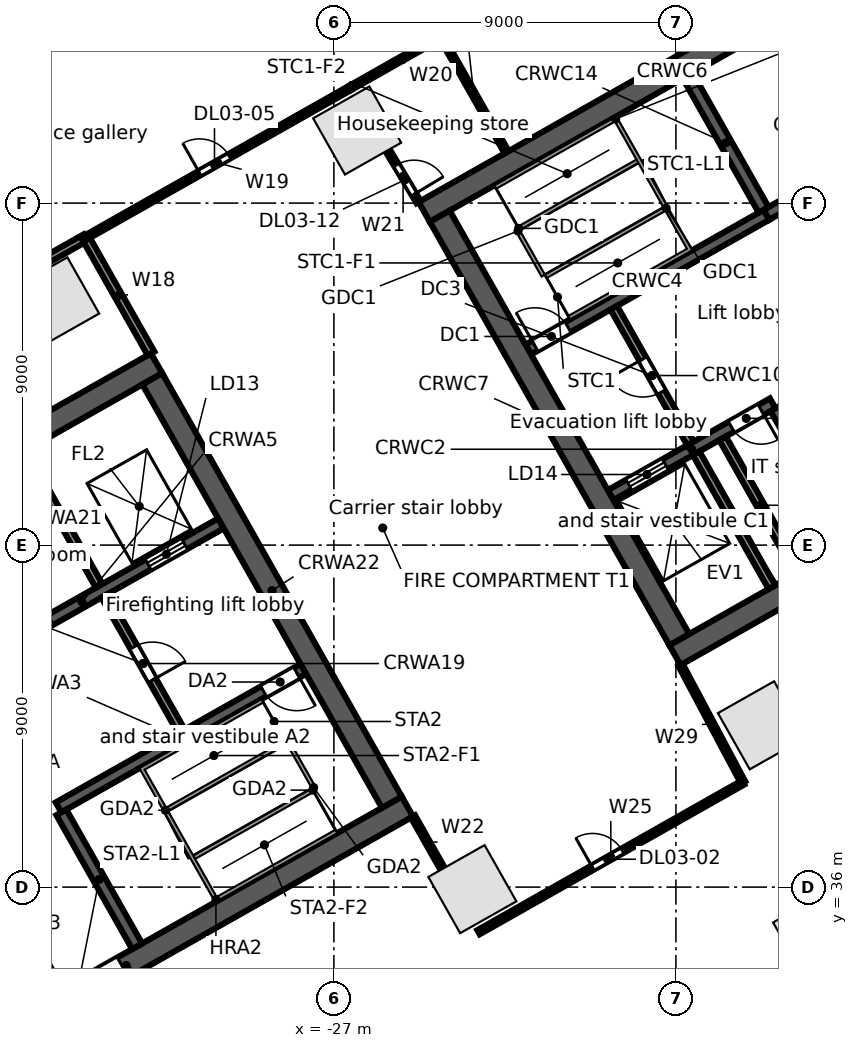
"""IFC4 building model, lengths in metres.
Left out: names, types, materials, properties, quantities, classifications, styles, units other than length and angle.
Written with IfcOpenShell. Run it as: python <this file> out.ifc"""

import sys

from ifc_helpers import new_model, si_unit, direction, frame, frame_2d, origin, origin_2d, place, context, subcontext, project, spatial, rectangle, extrude, element, fill, save


model = new_model("IFC4")
c1 = context("Model", 3, precision=1e-05, world=origin(), true_north=direction((0.0, 1.0)))
c2 = subcontext(c1, "Body", "Model", "MODEL_VIEW")
j1 = project(units=[si_unit("LENGTHUNIT", "METRE"), si_unit("PLANEANGLEUNIT", "RADIAN")], contexts=[c1])
p1 = place(None, origin())
s1 = spatial("IfcSite", under=j1, at=p1, CompositionType="ELEMENT")
p2 = place(p1, origin())
s2 = spatial("IfcBuilding", under=s1, at=p2, CompositionType="ELEMENT")
p3 = place(p2, frame((0.0, 0.0, 16.5)))
s3 = spatial("IfcBuildingStorey", under=s2, at=p3, CompositionType="ELEMENT", Elevation=16.5)
for number, where, z_axis, x_axis in (
    (1, (-26.388, 55.91, 0.0), (0.0, 0.0, 1.0), (-0.87, -0.492, 0.0)),
    (2, (-34.334, 51.414, 0.0), (0.0, 0.0, 1.0), (-0.87, -0.492, 0.0)),
    (3, (-23.356, 35.946, 0.0), (0.0, 0.0, 1.0), (0.87, 0.492, 0.0)),
    (4, (-15.736, 40.257, 0.0), (0.0, 0.0, 1.0), (0.87, 0.492, 0.0)),
):
    element("IfcColumn", number, at=place(p3, frame(where, z_axis=z_axis, x_axis=x_axis)), inside=s3, PredefinedType="COLUMN", context=c2, shape_type="SweptSolid", body=[
        extrude(rectangle(XDim=1.7, YDim=1.7, at=origin_2d()), origin(), (0.0, 0.0, 1.0), 5.0),
    ])
p4 = place(p3, frame((-14.761, 34.88, 0.0), z_axis=(0.0, 0.0, 1.0), x_axis=(0.87035569594, 0.492423560103, 0.0)))
e5 = element("IfcColumn", 5, at=p4, inside=s3, PredefinedType="COLUMN", context=c2, shape_type="SweptSolid", body=[
    extrude(rectangle(XDim=1.0, YDim=1.0, at=origin_2d()), origin(), (0.0, 0.0, 1.0), 5.0),
])
p5 = place(p3, frame((-63.707, 41.701, 0.0), z_axis=(0.0, 0.0, 1.0), x_axis=(0.870355510268, 0.492423888277, 0.0)))
e6 = element("IfcWall", 6, at=p5, inside=s3, PredefinedType="STANDARD", context=c2, shape_type="SweptSolid", body=[
    extrude(rectangle(XDim=67.903, YDim=0.3, at=frame_2d((33.952, 0.0))), origin(), (0.0, 0.0, 1.0), 4.65),
])
p6 = place(p3, frame((-39.862, 29.749, 0.0), z_axis=(0.0, 0.0, 1.0), x_axis=(0.870350116061, 0.492433422375, 0.0)))
e7 = element("IfcWall", 7, at=p6, inside=s3, PredefinedType="SOLIDWALL", context=c2, shape_type="SweptSolid", body=[
    extrude(rectangle(XDim=17.0, YDim=0.6, at=frame_2d((8.5, 0.0))), origin(), (0.0, 0.0, 1.0), 4.65),
])
p7 = place(p6, frame((7.2, 0.0, 0.0)))
e8 = element("IfcOpeningElement", 8, at=p7, cuts=e7, PredefinedType="OPENING", context=c2, shape_type="SweptSolid", body=[
    extrude(rectangle(XDim=1.2, YDim=2.1, at=frame_2d((0.6, 1.05))), frame((0.0, 0.31, 0.0), z_axis=(0.0, -1.0, 0.0), x_axis=(1.0, 0.0, 0.0)), (0.0, 0.0, 1.0), 0.62),
])
p8 = place(p3, frame((-34.245, 38.097, 0.0), z_axis=(0.0, 0.0, 1.0), x_axis=(0.870364910201, 0.492407273597, 0.0)))
e9 = element("IfcWall", 9, at=p8, inside=s3, PredefinedType="SOLIDWALL", context=c2, shape_type="SweptSolid", body=[
    extrude(rectangle(XDim=7.4, YDim=0.3, at=frame_2d((3.7, 0.0))), origin(), (0.0, 0.0, 1.0), 4.65),
])
p9 = place(p8, frame((6.2, 0.0, 0.0)))
e10 = element("IfcOpeningElement", 10, at=p9, cuts=e9, PredefinedType="OPENING", context=c2, shape_type="SweptSolid", body=[
    extrude(rectangle(XDim=1.0, YDim=2.1, at=frame_2d((0.5, 1.05))), frame((0.0, 0.16, 0.0), z_axis=(0.0, -1.0, 0.0), x_axis=(1.0, 0.0, 0.0)), (0.0, 0.0, 1.0), 0.32),
])
p10 = place(p3, frame((-37.282, 41.435, 0.0), z_axis=(0.0, 0.0, 1.0), x_axis=(0.870356516133, 0.492422110414, 0.0)))
e11 = element("IfcWall", 11, at=p10, inside=s3, PredefinedType="SOLIDWALL", context=c2, shape_type="SweptSolid", body=[
    extrude(rectangle(XDim=8.4, YDim=0.3, at=frame_2d((4.2, 0.0))), origin(), (0.0, 0.0, 1.0), 4.65),
])
p11 = place(p10, frame((6.2, 0.0, 0.0)))
e12 = element("IfcOpeningElement", 12, at=p11, cuts=e11, PredefinedType="OPENING", context=c2, shape_type="SweptSolid", body=[
    extrude(rectangle(XDim=1.1, YDim=2.1, at=frame_2d((0.55, 1.05))), frame((0.0, 0.16, 0.0), z_axis=(0.0, -1.0, 0.0), x_axis=(1.0, 0.0, 0.0)), (0.0, 0.0, 1.0), 0.32),
])
p12 = place(p10, frame((2.35, 0.0, 0.0)))
e13 = element("IfcOpeningElement", 13, at=p12, cuts=e11, PredefinedType="OPENING", context=c2, shape_type="SweptSolid", body=[
    extrude(rectangle(XDim=0.9, YDim=2.1, at=frame_2d((0.45, 1.05))), frame((0.0, 0.16, 0.0), z_axis=(0.0, -1.0, 0.0), x_axis=(1.0, 0.0, 0.0)), (0.0, 0.0, 1.0), 0.32),
])
p13 = place(p3, frame((-46.461, 41.412, 0.0), z_axis=(0.0, 0.0, 1.0), x_axis=(0.870350116061, 0.492433422375, 0.0)))
e14 = element("IfcWall", 14, at=p13, inside=s3, PredefinedType="SOLIDWALL", context=c2, shape_type="SweptSolid", body=[
    extrude(rectangle(XDim=17.0, YDim=0.6, at=frame_2d((8.5, 0.0))), origin(), (0.0, 0.0, 1.0), 4.65),
])
p14 = place(p3, frame((-36.26, 36.785, 0.0), z_axis=(0.0, 0.0, 1.0), x_axis=(0.492440575896, -0.870346068648, 0.0)))
e15 = element("IfcWall", 15, at=p14, inside=s3, PredefinedType="SOLIDWALL", context=c2, shape_type="SweptSolid", body=[
    extrude(rectangle(XDim=4.05, YDim=0.3, at=frame_2d((2.025, 0.0))), origin(), (0.0, 0.0, 1.0), 4.65),
])
p15 = place(p3, frame((-34.171, 37.967, 0.0), z_axis=(0.0, 0.0, 1.0), x_axis=(0.492394910396, -0.870371904542, 0.0)))
e16 = element("IfcWall", 16, at=p15, inside=s3, PredefinedType="SOLIDWALL", context=c2, shape_type="SweptSolid", body=[
    extrude(rectangle(XDim=4.05, YDim=0.3, at=frame_2d((2.025, 0.0))), origin(), (0.0, 0.0, 1.0), 4.65),
])
p16 = place(p3, frame((-33.031, 43.667, 0.0), z_axis=(0.0, 0.0, 1.0), x_axis=(0.492408451753, -0.87036424366, 0.0)))
e17 = element("IfcWall", 17, at=p16, inside=s3, PredefinedType="PARTITIONING", context=c2, shape_type="SweptSolid", body=[
    extrude(rectangle(XDim=4.1, YDim=0.2, at=frame_2d((2.05, 0.0))), origin(), (0.0, 0.0, 1.0), 4.65),
])
p17 = place(p16, frame((1.55, 0.0, 0.0)))
e18 = element("IfcOpeningElement", 18, at=p17, cuts=e17, PredefinedType="OPENING", context=c2, shape_type="SweptSolid", body=[
    extrude(rectangle(XDim=1.0, YDim=2.1, at=frame_2d((0.5, 1.05))), frame((0.0, 0.11, 0.0), z_axis=(0.0, -1.0, 0.0), x_axis=(1.0, 0.0, 0.0)), (0.0, 0.0, 1.0), 0.22),
])
p18 = place(p3, frame((-35.173, 47.454, 0.0), z_axis=(0.0, 0.0, 1.0), x_axis=(0.492440575896, -0.870346068648, 0.0)))
e19 = element("IfcWall", 19, at=p18, inside=s3, PredefinedType="SOLIDWALL", context=c2, shape_type="SweptSolid", body=[
    extrude(rectangle(XDim=4.05, YDim=0.2, at=frame_2d((2.025, 0.0))), origin(), (0.0, 0.0, 1.0), 4.65),
])
p19 = place(p3, frame((-31.778, 49.374, 0.0), z_axis=(0.0, 0.0, 1.0), x_axis=(0.492433046652, -0.870350328641, 0.0)))
e20 = element("IfcWall", 20, at=p19, inside=s3, PredefinedType="SOLIDWALL", context=c2, shape_type="SweptSolid", body=[
    extrude(rectangle(XDim=12.8, YDim=0.6, at=frame_2d((6.4, 0.0))), origin(), (0.0, 0.0, 1.0), 4.65),
])
p20 = place(p3, frame((-18.024, 42.104, 0.0), z_axis=(0.0, 0.0, 1.0), x_axis=(0.870360574057, 0.492414937962, 0.0)))
e21 = element("IfcWall", 21, at=p20, inside=s3, PredefinedType="SOLIDWALL", context=c2, shape_type="SweptSolid", body=[
    extrude(rectangle(XDim=15.0, YDim=0.6, at=frame_2d((7.5, 0.0))), origin(), (0.0, 0.0, 1.0), 4.65),
])
p21 = place(p20, frame((6.1, 0.0, 0.0)))
e22 = element("IfcOpeningElement", 22, at=p21, cuts=e21, PredefinedType="OPENING", context=c2, shape_type="SweptSolid", body=[
    extrude(rectangle(XDim=1.2, YDim=2.1, at=frame_2d((0.6, 1.05))), frame((0.0, 0.31, 0.0), z_axis=(0.0, -1.0, 0.0), x_axis=(1.0, 0.0, 0.0)), (0.0, 0.0, 1.0), 0.62),
])
p22 = place(p3, frame((-19.718, 46.316, 0.0), z_axis=(0.0, 0.0, 1.0), x_axis=(0.870353963862, 0.492426621528, 0.0)))
e23 = element("IfcWall", 23, at=p22, inside=s3, PredefinedType="SOLIDWALL", context=c2, shape_type="SweptSolid", body=[
    extrude(rectangle(XDim=4.9, YDim=0.3, at=frame_2d((2.45, 0.0))), origin(), (0.0, 0.0, 1.0), 4.65),
])
p23 = place(p22, frame((0.55, 0.0, 0.0)))
e24 = element("IfcOpeningElement", 24, at=p23, cuts=e23, PredefinedType="OPENING", context=c2, shape_type="SweptSolid", body=[
    extrude(rectangle(XDim=1.1, YDim=2.1, at=frame_2d((0.55, 1.05))), frame((0.0, 0.16, 0.0), z_axis=(0.0, -1.0, 0.0), x_axis=(1.0, 0.0, 0.0)), (0.0, 0.0, 1.0), 0.32),
])
p24 = place(p22, frame((3.65, 0.0, 0.0)))
e25 = element("IfcOpeningElement", 25, at=p24, cuts=e23, PredefinedType="OPENING", context=c2, shape_type="SweptSolid", body=[
    extrude(rectangle(XDim=0.9, YDim=2.1, at=frame_2d((0.45, 1.05))), frame((0.0, 0.16, 0.0), z_axis=(0.0, -1.0, 0.0), x_axis=(1.0, 0.0, 0.0)), (0.0, 0.0, 1.0), 0.32),
])
p25 = place(p3, frame((-21.885, 50.146, 0.0), z_axis=(0.0, 0.0, 1.0), x_axis=(0.870359411463, 0.492416992881, 0.0)))
e26 = element("IfcWall", 26, at=p25, inside=s3, PredefinedType="SOLIDWALL", context=c2, shape_type="SweptSolid", body=[
    extrude(rectangle(XDim=7.2, YDim=0.3, at=frame_2d((3.6, 0.0))), origin(), (0.0, 0.0, 1.0), 4.65),
])
p26 = place(p25, frame((0.2, 0.0, 0.0)))
e27 = element("IfcOpeningElement", 27, at=p26, cuts=e26, PredefinedType="OPENING", context=c2, shape_type="SweptSolid", body=[
    extrude(rectangle(XDim=1.0, YDim=2.1, at=frame_2d((0.5, 1.05))), frame((0.0, 0.16, 0.0), z_axis=(0.0, -1.0, 0.0), x_axis=(1.0, 0.0, 0.0)), (0.0, 0.0, 1.0), 0.32),
])
p27 = place(p3, frame((-15.618, 53.691, 0.0), z_axis=(0.0, 0.0, 1.0), x_axis=(0.870356769198, 0.492421663121, 0.0)))
e28 = element("IfcWall", 28, at=p27, inside=s3, PredefinedType="SOLIDWALL", context=c2, shape_type="SweptSolid", body=[
    extrude(rectangle(XDim=6.6, YDim=0.3, at=frame_2d((3.3, 0.0))), origin(), (0.0, 0.0, 1.0), 4.65),
])
p28 = place(p27, frame((3.0, 0.0, 0.0)))
e29 = element("IfcOpeningElement", 29, at=p28, cuts=e28, PredefinedType="OPENING", context=c2, shape_type="SweptSolid", body=[
    extrude(rectangle(XDim=0.9, YDim=2.1, at=frame_2d((0.45, 1.05))), frame((0.0, 0.16, 0.0), z_axis=(0.0, -1.0, 0.0), x_axis=(1.0, 0.0, 0.0)), (0.0, 0.0, 1.0), 0.32),
])
p29 = place(p3, frame((-24.623, 53.767, 0.0), z_axis=(0.0, 0.0, 1.0), x_axis=(0.870356627484, 0.492421913601, 0.0)))
e30 = element("IfcWall", 30, at=p29, inside=s3, PredefinedType="SOLIDWALL", context=c2, shape_type="SweptSolid", body=[
    extrude(rectangle(XDim=15.0, YDim=0.6, at=frame_2d((7.5, 0.0))), origin(), (0.0, 0.0, 1.0), 4.65),
])
p30 = place(p3, frame((-24.214, 53.654, 0.0), z_axis=(0.0, 0.0, 1.0), x_axis=(0.492441221355, -0.870345703448, 0.0)))
e31 = element("IfcWall", 31, at=p30, inside=s3, PredefinedType="SOLIDWALL", context=c2, shape_type="SweptSolid", body=[
    extrude(rectangle(XDim=12.8, YDim=0.6, at=frame_2d((6.4, 0.0))), origin(), (0.0, 0.0, 1.0), 4.65),
])
p31 = place(p3, frame((-17.469, 47.417, 0.0), z_axis=(0.0, 0.0, 1.0), x_axis=(0.492440575896, -0.870346068648, 0.0)))
e32 = element("IfcWall", 32, at=p31, inside=s3, PredefinedType="SOLIDWALL", context=c2, shape_type="SweptSolid", body=[
    extrude(rectangle(XDim=4.05, YDim=0.2, at=frame_2d((2.025, 0.0))), origin(), (0.0, 0.0, 1.0), 4.65),
])
p32 = place(p3, frame((-19.635, 51.246, 0.0), z_axis=(0.0, 0.0, 1.0), x_axis=(0.492408451753, -0.87036424366, 0.0)))
e33 = element("IfcWall", 33, at=p32, inside=s3, PredefinedType="PARTITIONING", context=c2, shape_type="SweptSolid", body=[
    extrude(rectangle(XDim=4.1, YDim=0.2, at=frame_2d((2.05, 0.0))), origin(), (0.0, 0.0, 1.0), 4.65),
])
p33 = place(p32, frame((1.55, 0.0, 0.0)))
e34 = element("IfcOpeningElement", 34, at=p33, cuts=e33, PredefinedType="OPENING", context=c2, shape_type="SweptSolid", body=[
    extrude(rectangle(XDim=1.0, YDim=2.1, at=frame_2d((0.5, 1.05))), frame((0.0, 0.11, 0.0), z_axis=(0.0, -1.0, 0.0), x_axis=(1.0, 0.0, 0.0)), (0.0, 0.0, 1.0), 0.22),
])
p34 = place(p3, frame((-16.772, 47.811, 0.0), z_axis=(0.0, 0.0, 1.0), x_axis=(0.492440575896, -0.870346068648, 0.0)))
e35 = element("IfcWall", 35, at=p34, inside=s3, PredefinedType="SOLIDWALL", context=c2, shape_type="SweptSolid", body=[
    extrude(rectangle(XDim=4.05, YDim=0.2, at=frame_2d((2.025, 0.0))), origin(), (0.0, 0.0, 1.0), 4.65),
])
p35 = place(p3, frame((-15.379, 48.599, 0.0), z_axis=(0.0, 0.0, 1.0), x_axis=(0.492394910396, -0.870371904542, 0.0)))
e36 = element("IfcWall", 36, at=p35, inside=s3, PredefinedType="SOLIDWALL", context=c2, shape_type="SweptSolid", body=[
    extrude(rectangle(XDim=4.05, YDim=0.3, at=frame_2d((2.025, 0.0))), origin(), (0.0, 0.0, 1.0), 4.65),
])
p36 = place(p3, frame((-17.686, 57.347, 0.0), z_axis=(0.0, 0.0, 1.0), x_axis=(0.492420746998, -0.870357287513, 0.0)))
e37 = element("IfcWall", 37, at=p36, inside=s3, PredefinedType="SOLIDWALL", context=c2, shape_type="SweptSolid", body=[
    extrude(rectangle(XDim=4.05, YDim=0.3, at=frame_2d((2.025, 0.0))), origin(), (0.0, 0.0, 1.0), 4.65),
])
p37 = place(p3, frame((-40.934, 48.905, 0.0), z_axis=(0.0, 0.0, 1.0), x_axis=(0.870387854278, 0.492366716102, 0.0)))
e38 = element("IfcWall", 38, at=p37, inside=s3, PredefinedType="PARTITIONING", context=c2, shape_type="SweptSolid", body=[
    extrude(rectangle(XDim=8.5, YDim=0.2, at=frame_2d((4.25, 0.0))), origin(), (0.0, 0.0, 1.0), 4.03),
])
p38 = place(p3, frame((-33.536, 53.09, 0.0), z_axis=(0.0, 0.0, 1.0), x_axis=(0.492521469645, -0.870300294116, 0.0)))
e39 = element("IfcWall", 39, at=p38, inside=s3, PredefinedType="PARTITIONING", context=c2, shape_type="SweptSolid", body=[
    extrude(rectangle(XDim=3.5, YDim=0.2, at=frame_2d((1.75, 0.0))), origin(), (0.0, 0.0, 1.0), 3.93),
])
p39 = place(p3, frame((-33.536, 53.09, 0.0), z_axis=(0.0, 0.0, 1.0), x_axis=(0.870327439455, 0.492473499928, 0.0)))
e40 = element("IfcWall", 40, at=p39, inside=s3, PredefinedType="PARTITIONING", context=c2, shape_type="SweptSolid", body=[
    extrude(rectangle(XDim=8.0, YDim=0.125, at=frame_2d((4.0, 0.0))), origin(), (0.0, 0.0, 1.0), 3.712),
])
p40 = place(p39, frame((3.45, 0.0, 0.0)))
e41 = element("IfcOpeningElement", 41, at=p40, cuts=e40, PredefinedType="OPENING", context=c2, shape_type="SweptSolid", body=[
    extrude(rectangle(XDim=0.9, YDim=2.1, at=frame_2d((0.45, 1.05))), frame((0.0, 0.073, 0.0), z_axis=(0.0, -1.0, 0.0), x_axis=(1.0, 0.0, 0.0)), (0.0, 0.0, 1.0), 0.145),
])
p41 = place(p3, frame((-26.573, 57.03, 0.0), z_axis=(0.0, 0.0, 1.0), x_axis=(0.870344460795, 0.492443417626, 0.0)))
e42 = element("IfcWall", 42, at=p41, inside=s3, PredefinedType="PARTITIONING", context=c2, shape_type="SweptSolid", body=[
    extrude(rectangle(XDim=2.75, YDim=0.125, at=frame_2d((1.375, 0.0))), origin(), (0.0, 0.0, 1.0), 4.65),
])
p42 = place(p3, frame((-25.587, 55.387, 0.0), z_axis=(0.0, 0.0, 1.0), x_axis=(0.514767546849, -0.857329792268, 0.0)))
e43 = element("IfcWall", 43, at=p42, inside=s3, PredefinedType="PARTITIONING", context=c2, shape_type="SweptSolid", body=[
    extrude(rectangle(XDim=1.585, YDim=0.125, at=frame_2d((0.792, 0.0))), origin(), (0.0, 0.0, 1.0), 4.65),
])
p43 = place(p42, frame((0.45, 0.0, 0.0)))
e44 = element("IfcOpeningElement", 44, at=p43, cuts=e43, PredefinedType="OPENING", context=c2, shape_type="SweptSolid", body=[
    extrude(rectangle(XDim=0.9, YDim=2.1, at=frame_2d((0.45, 1.05))), frame((0.0, 0.073, 0.0), z_axis=(0.0, -1.0, 0.0), x_axis=(1.0, 0.0, 0.0)), (0.0, 0.0, 1.0), 0.145),
])
p44 = place(p3, frame((-24.919, 37.859, 0.0), z_axis=(0.0, 0.0, 1.0), x_axis=(0.492366981934, -0.870387703901, 0.0)))
e45 = element("IfcWall", 45, at=p44, inside=s3, PredefinedType="PARTITIONING", context=c2, shape_type="SweptSolid", body=[
    extrude(rectangle(XDim=1.584, YDim=0.125, at=frame_2d((0.792, 0.0))), origin(), (0.0, 0.0, 1.0), 4.65),
])
p45 = place(p3, frame((-24.18, 58.384, 0.0), z_axis=(0.0, 0.0, 1.0), x_axis=(0.492521469645, -0.870300294116, 0.0)))
e46 = element("IfcWall", 46, at=p45, inside=s3, PredefinedType="PARTITIONING", context=c2, shape_type="SweptSolid", body=[
    extrude(rectangle(XDim=3.5, YDim=0.125, at=frame_2d((1.75, 0.0))), origin(), (0.0, 0.0, 1.0), 3.93),
])
p46 = place(p3, frame((-23.195, 34.813, 0.0), z_axis=(0.0, 0.0, 1.0), x_axis=(0.870387155114, 0.492367952057, 0.0)))
e47 = element("IfcWall", 47, at=p46, inside=s3, PredefinedType="PARTITIONING", context=c2, shape_type="SweptSolid", body=[
    extrude(rectangle(XDim=8.0, YDim=0.125, at=frame_2d((4.0, 0.0))), origin(), (0.0, 0.0, 1.0), 4.03),
])
p47 = place(p46, frame((3.45, 0.0, 0.0)))
e48 = element("IfcOpeningElement", 48, at=p47, cuts=e47, PredefinedType="OPENING", context=c2, shape_type="SweptSolid", body=[
    extrude(rectangle(XDim=0.9, YDim=2.1, at=frame_2d((0.45, 1.05))), frame((0.0, 0.073, 0.0), z_axis=(0.0, -1.0, 0.0), x_axis=(1.0, 0.0, 0.0)), (0.0, 0.0, 1.0), 0.145),
])
p48 = place(p3, frame((-17.877, 41.843, 0.0), z_axis=(0.0, 0.0, 1.0), x_axis=(0.469799130562, -0.882773344026, 0.0)))
e49 = element("IfcWall", 49, at=p48, inside=s3, PredefinedType="PARTITIONING", context=c2, shape_type="SweptSolid", body=[
    extrude(rectangle(XDim=3.501, YDim=0.125, at=frame_2d((1.751, 0.0))), origin(), (0.0, 0.0, 1.0), 3.93),
])
p49 = place(p11, origin())
e50 = element("IfcDoor", 50, at=p49, inside=s3, OperationType="DOUBLE_DOOR_SLIDING", PredefinedType="DOOR", context=c2, shape_type="SweptSolid", body=[
    extrude(rectangle(XDim=1.1, YDim=2.1, at=frame_2d((0.55, 1.05))), frame((0.0, 0.025, 0.0), z_axis=(0.0, -1.0, 0.0), x_axis=(1.0, 0.0, 0.0)), (0.0, 0.0, 1.0), 0.05),
])
fill(e12, e50)
p50 = place(p9, frame((1.0, 0.0, 0.0), z_axis=(0.0, 0.0, 1.0), x_axis=(-1.0, 0.0, 0.0)))
e51 = element("IfcDoor", 51, at=p50, inside=s3, OperationType="SINGLE_SWING_LEFT", PredefinedType="DOOR", context=c2, shape_type="SweptSolid", body=[
    extrude(rectangle(XDim=1.0, YDim=2.1, at=frame_2d((0.5, 1.05))), frame((0.0, 0.025, 0.0), z_axis=(0.0, -1.0, 0.0), x_axis=(1.0, 0.0, 0.0)), (0.0, 0.0, 1.0), 0.05),
])
fill(e10, e51)
p51 = place(p17, origin())
e52 = element("IfcDoor", 52, at=p51, inside=s3, OperationType="SINGLE_SWING_RIGHT", PredefinedType="DOOR", context=c2, shape_type="SweptSolid", body=[
    extrude(rectangle(XDim=1.0, YDim=2.1, at=frame_2d((0.5, 1.05))), frame((0.0, 0.025, 0.0), z_axis=(0.0, -1.0, 0.0), x_axis=(1.0, 0.0, 0.0)), (0.0, 0.0, 1.0), 0.05),
])
fill(e18, e52)
p52 = place(p7, frame((1.2, 0.0, 0.0), z_axis=(0.0, 0.0, 1.0), x_axis=(-1.0, 0.0, 0.0)))
e53 = element("IfcDoor", 53, at=p52, inside=s3, OperationType="SINGLE_SWING_RIGHT", PredefinedType="DOOR", context=c2, shape_type="SweptSolid", body=[
    extrude(rectangle(XDim=1.2, YDim=2.1, at=frame_2d((0.6, 1.05))), frame((0.0, 0.025, 0.0), z_axis=(0.0, -1.0, 0.0), x_axis=(1.0, 0.0, 0.0)), (0.0, 0.0, 1.0), 0.05),
])
fill(e8, e53)
p53 = place(p23, origin())
e54 = element("IfcDoor", 54, at=p53, inside=s3, OperationType="DOUBLE_DOOR_SLIDING", PredefinedType="DOOR", context=c2, shape_type="SweptSolid", body=[
    extrude(rectangle(XDim=1.1, YDim=2.1, at=frame_2d((0.55, 1.05))), frame((0.0, 0.025, 0.0), z_axis=(0.0, -1.0, 0.0), x_axis=(1.0, 0.0, 0.0)), (0.0, 0.0, 1.0), 0.05),
])
fill(e24, e54)
p54 = place(p26, origin())
e55 = element("IfcDoor", 55, at=p54, inside=s3, OperationType="SINGLE_SWING_LEFT", PredefinedType="DOOR", context=c2, shape_type="SweptSolid", body=[
    extrude(rectangle(XDim=1.0, YDim=2.1, at=frame_2d((0.5, 1.05))), frame((0.0, 0.025, 0.0), z_axis=(0.0, -1.0, 0.0), x_axis=(1.0, 0.0, 0.0)), (0.0, 0.0, 1.0), 0.05),
])
fill(e27, e55)
p55 = place(p33, frame((1.0, 0.0, 0.0), z_axis=(0.0, 0.0, 1.0), x_axis=(-1.0, 0.0, 0.0)))
e56 = element("IfcDoor", 56, at=p55, inside=s3, OperationType="SINGLE_SWING_RIGHT", PredefinedType="DOOR", context=c2, shape_type="SweptSolid", body=[
    extrude(rectangle(XDim=1.0, YDim=2.1, at=frame_2d((0.5, 1.05))), frame((0.0, 0.025, 0.0), z_axis=(0.0, -1.0, 0.0), x_axis=(1.0, 0.0, 0.0)), (0.0, 0.0, 1.0), 0.05),
])
fill(e34, e56)
p56 = place(p24, frame((0.9, 0.0, 0.0), z_axis=(0.0, 0.0, 1.0), x_axis=(-1.0, 0.0, 0.0)))
e57 = element("IfcDoor", 57, at=p56, inside=s3, OperationType="SINGLE_SWING_LEFT", PredefinedType="DOOR", context=c2, shape_type="SweptSolid", body=[
    extrude(rectangle(XDim=0.9, YDim=2.1, at=frame_2d((0.45, 1.05))), frame((0.0, 0.025, 0.0), z_axis=(0.0, -1.0, 0.0), x_axis=(1.0, 0.0, 0.0)), (0.0, 0.0, 1.0), 0.05),
])
fill(e25, e57)
p57 = place(p47, origin())
e58 = element("IfcDoor", 58, at=p57, inside=s3, OperationType="SINGLE_SWING_LEFT", PredefinedType="DOOR", context=c2, shape_type="SweptSolid", body=[
    extrude(rectangle(XDim=0.9, YDim=2.1, at=frame_2d((0.45, 1.05))), frame((0.0, 0.025, 0.0), z_axis=(0.0, -1.0, 0.0), x_axis=(1.0, 0.0, 0.0)), (0.0, 0.0, 1.0), 0.05),
])
fill(e48, e58)
p58 = place(p40, origin())
e59 = element("IfcDoor", 59, at=p58, inside=s3, OperationType="SINGLE_SWING_LEFT", PredefinedType="DOOR", context=c2, shape_type="SweptSolid", body=[
    extrude(rectangle(XDim=0.9, YDim=2.1, at=frame_2d((0.45, 1.05))), frame((0.0, 0.025, 0.0), z_axis=(0.0, -1.0, 0.0), x_axis=(1.0, 0.0, 0.0)), (0.0, 0.0, 1.0), 0.05),
])
fill(e41, e59)
p59 = place(p43, origin())
e60 = element("IfcDoor", 60, at=p59, inside=s3, OperationType="SINGLE_SWING_RIGHT", PredefinedType="DOOR", context=c2, shape_type="SweptSolid", body=[
    extrude(rectangle(XDim=0.9, YDim=2.1, at=frame_2d((0.45, 1.05))), frame((0.0, 0.025, 0.0), z_axis=(0.0, -1.0, 0.0), x_axis=(1.0, 0.0, 0.0)), (0.0, 0.0, 1.0), 0.05),
])
fill(e44, e60)
save(model, sys.argv[1])
